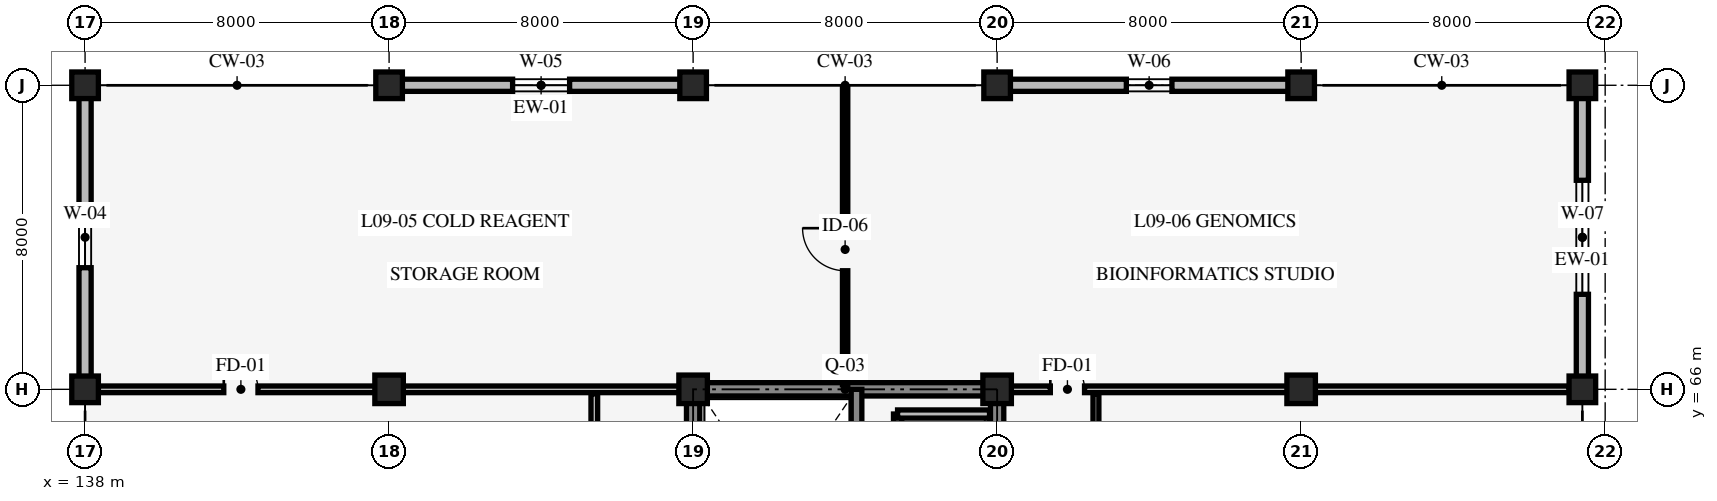
"""IFC4 building model, lengths in metres.
Left out: names, types, materials, properties, quantities, classifications, styles, units other than length and angle.
Written with IfcOpenShell. Run it as: python <this file> out.ifc"""

import sys

from ifc_helpers import new_model, si_unit, direction, frame, frame_2d, origin, origin_2d, place, context, subcontext, project, spatial, rectangle, extrude, element, fill, save


model = new_model("IFC4")
c1 = context("Model", 3, precision=1e-05, world=origin(), true_north=direction((0.0, 1.0)))
c2 = subcontext(c1, "Body", "Model", "MODEL_VIEW")
j1 = project(units=[si_unit("LENGTHUNIT", "METRE"), si_unit("PLANEANGLEUNIT", "RADIAN")], contexts=[c1])
p1 = place(None, origin())
s1 = spatial("IfcSite", under=j1, at=p1, CompositionType="ELEMENT")
p2 = place(p1, origin())
s2 = spatial("IfcBuilding", under=s1, at=p2, CompositionType="ELEMENT")
p3 = place(p2, frame((0.0, 0.0, 36.0)))
s3 = spatial("IfcBuildingStorey", under=s2, at=p3, CompositionType="ELEMENT", Elevation=36.0)
p4 = place(p3, frame((162.0, 58.0, 0.0), z_axis=(0.0, 0.0, 1.0), x_axis=(0.0, 1.0, 0.0)))
e1 = element("IfcWall", 1, at=p4, inside=s3, PredefinedType="SHEAR", context=c2, shape_type="SweptSolid", body=[
    extrude(rectangle(XDim=8.0, YDim=0.35, at=frame_2d((4.0, 0.0))), origin(), (0.0, 0.0, 1.0), 3.95),
])
p5 = place(p4, frame((3.275, 0.0, 0.0)))
e2 = element("IfcOpeningElement", 2, at=p5, cuts=e1, PredefinedType="OPENING", context=c2, shape_type="SweptSolid", body=[
    extrude(rectangle(XDim=1.05, YDim=2.2, at=frame_2d((0.525, 1.1))), frame((0.0, 0.185, 0.0), z_axis=(0.0, -1.0, 0.0), x_axis=(1.0, 0.0, 0.0)), (0.0, 0.0, 1.0), 0.37),
])
p6 = place(p4, frame((5.45, 0.0, 0.0)))
e3 = element("IfcOpeningElement", 3, at=p6, cuts=e1, PredefinedType="OPENING", context=c2, shape_type="SweptSolid", body=[
    extrude(rectangle(XDim=1.4, YDim=2.3, at=frame_2d((0.7, 1.15))), frame((0.0, 0.185, 0.0), z_axis=(0.0, -1.0, 0.0), x_axis=(1.0, 0.0, 0.0)), (0.0, 0.0, 1.0), 0.37),
])
for number, where, z_axis, x_axis in (
    (4, (162.0, 66.0, 0.0), (0.0, 0.0, 1.0), (-1.0, 0.0, 0.0)),
    (5, (154.0, 66.0, 0.0), (0.0, 0.0, 1.0), (0.0, -1.0, 0.0)),
):
    element("IfcWall", number, at=place(p3, frame(where, z_axis=z_axis, x_axis=x_axis)), inside=s3, PredefinedType="SHEAR", context=c2, shape_type="SweptSolid", body=[
        extrude(rectangle(XDim=8.0, YDim=0.35, at=frame_2d((4.0, 0.0))), origin(), (0.0, 0.0, 1.0), 3.95),
    ])
p7 = place(p3, frame((158.3, 58.0, 0.0), z_axis=(0.0, 0.0, 1.0), x_axis=(0.0, 1.0, 0.0)))
e6 = element("IfcWall", 6, at=p7, inside=s3, PredefinedType="SHEAR", context=c2, shape_type="SweptSolid", body=[
    extrude(rectangle(XDim=8.0, YDim=0.28, at=frame_2d((4.0, 0.0))), origin(), (0.0, 0.0, 1.0), 3.95),
])
for number, where, z_axis, x_axis in (
    (7, (138.0, 66.0, 0.0), (0.0, 0.0, 1.0), (1.0, 0.0, 0.0)),
    (8, (138.0, 74.0, 0.0), (0.0, 0.0, 1.0), (1.0, 0.0, 0.0)),
):
    element("IfcColumn", number, at=place(p3, frame(where, z_axis=z_axis, x_axis=x_axis)), inside=s3, PredefinedType="COLUMN", context=c2, shape_type="SweptSolid", body=[
        extrude(rectangle(XDim=0.7, YDim=0.7, at=origin_2d()), origin(), (0.0, 0.0, 1.0), 4.2),
    ])
p8 = place(p3, frame((146.0, 66.0, 0.0), z_axis=(0.0, 0.0, 1.0), x_axis=(1.0, 0.0, 0.0)))
e9 = element("IfcColumn", 9, at=p8, inside=s3, PredefinedType="COLUMN", context=c2, shape_type="SweptSolid", body=[
    extrude(rectangle(XDim=0.75, YDim=0.75, at=origin_2d()), origin(), (0.0, 0.0, 1.0), 4.2),
])
p9 = place(p3, frame((146.0, 74.0, 0.0), z_axis=(0.0, 0.0, 1.0), x_axis=(1.0, 0.0, 0.0)))
e10 = element("IfcColumn", 10, at=p9, inside=s3, PredefinedType="COLUMN", context=c2, shape_type="SweptSolid", body=[
    extrude(rectangle(XDim=0.7, YDim=0.7, at=origin_2d()), origin(), (0.0, 0.0, 1.0), 4.2),
])
p10 = place(p3, frame((154.0, 66.0, 0.0), z_axis=(0.0, 0.0, 1.0), x_axis=(1.0, 0.0, 0.0)))
e11 = element("IfcColumn", 11, at=p10, inside=s3, PredefinedType="COLUMN", context=c2, shape_type="SweptSolid", body=[
    extrude(rectangle(XDim=0.75, YDim=0.75, at=origin_2d()), origin(), (0.0, 0.0, 1.0), 4.2),
])
p11 = place(p3, frame((154.0, 74.0, 0.0), z_axis=(0.0, 0.0, 1.0), x_axis=(1.0, 0.0, 0.0)))
e12 = element("IfcColumn", 12, at=p11, inside=s3, PredefinedType="COLUMN", context=c2, shape_type="SweptSolid", body=[
    extrude(rectangle(XDim=0.7, YDim=0.7, at=origin_2d()), origin(), (0.0, 0.0, 1.0), 4.2),
])
p12 = place(p3, frame((162.0, 66.0, 0.0), z_axis=(0.0, 0.0, 1.0), x_axis=(1.0, 0.0, 0.0)))
e13 = element("IfcColumn", 13, at=p12, inside=s3, PredefinedType="COLUMN", context=c2, shape_type="SweptSolid", body=[
    extrude(rectangle(XDim=0.75, YDim=0.75, at=origin_2d()), origin(), (0.0, 0.0, 1.0), 4.2),
])
p13 = place(p3, frame((162.0, 74.0, 0.0), z_axis=(0.0, 0.0, 1.0), x_axis=(1.0, 0.0, 0.0)))
e14 = element("IfcColumn", 14, at=p13, inside=s3, PredefinedType="COLUMN", context=c2, shape_type="SweptSolid", body=[
    extrude(rectangle(XDim=0.7, YDim=0.7, at=origin_2d()), origin(), (0.0, 0.0, 1.0), 4.2),
])
p14 = place(p3, frame((170.0, 66.0, 0.0), z_axis=(0.0, 0.0, 1.0), x_axis=(1.0, 0.0, 0.0)))
e15 = element("IfcColumn", 15, at=p14, inside=s3, PredefinedType="COLUMN", context=c2, shape_type="SweptSolid", body=[
    extrude(rectangle(XDim=0.75, YDim=0.75, at=origin_2d()), origin(), (0.0, 0.0, 1.0), 4.2),
])
for number, where, z_axis, x_axis in (
    (16, (170.0, 74.0, 0.0), (0.0, 0.0, 1.0), (1.0, 0.0, 0.0)),
    (17, (177.4, 66.0, 0.0), (0.0, 0.0, 1.0), (1.0, 0.0, 0.0)),
    (18, (177.4, 74.0, 0.0), (0.0, 0.0, 1.0), (1.0, 0.0, 0.0)),
):
    element("IfcColumn", number, at=place(p3, frame(where, z_axis=z_axis, x_axis=x_axis)), inside=s3, PredefinedType="COLUMN", context=c2, shape_type="SweptSolid", body=[
        extrude(rectangle(XDim=0.7, YDim=0.7, at=origin_2d()), origin(), (0.0, 0.0, 1.0), 4.2),
    ])
p15 = place(p3, frame((138.0, 66.0, 0.0), z_axis=(0.0, 0.0, 1.0), x_axis=(0.0, 1.0, 0.0)))
e19 = element("IfcWall", 19, at=p15, inside=s3, PredefinedType="STANDARD", context=c2, shape_type="SweptSolid", body=[
    extrude(rectangle(XDim=8.0, YDim=0.32, at=frame_2d((4.0, 0.0))), origin(), (0.0, 0.0, 1.0), 3.4),
])
p16 = place(p15, frame((3.2, 0.0, 0.85)))
e20 = element("IfcOpeningElement", 20, at=p16, cuts=e19, PredefinedType="OPENING", context=c2, shape_type="SweptSolid", body=[
    extrude(rectangle(XDim=1.6, YDim=1.2, at=frame_2d((0.8, 0.6))), frame((0.0, 0.17, 0.0), z_axis=(0.0, -1.0, 0.0), x_axis=(1.0, 0.0, 0.0)), (0.0, 0.0, 1.0), 0.34),
])
p17 = place(p3, frame((146.0, 74.0, 0.0), z_axis=(0.0, 0.0, 1.0), x_axis=(1.0, 0.0, 0.0)))
e21 = element("IfcWall", 21, at=p17, inside=s3, PredefinedType="STANDARD", context=c2, shape_type="SweptSolid", body=[
    extrude(rectangle(XDim=8.0, YDim=0.32, at=frame_2d((4.0, 0.0))), origin(), (0.0, 0.0, 1.0), 3.19),
])
p18 = place(p17, frame((3.25, 0.0, 0.85)))
e22 = element("IfcOpeningElement", 22, at=p18, cuts=e21, PredefinedType="OPENING", context=c2, shape_type="SweptSolid", body=[
    extrude(rectangle(XDim=1.5, YDim=1.5, at=frame_2d((0.75, 0.75))), frame((0.0, 0.17, 0.0), z_axis=(0.0, -1.0, 0.0), x_axis=(1.0, 0.0, 0.0)), (0.0, 0.0, 1.0), 0.34),
])
p19 = place(p3, frame((162.0, 74.0, 0.0), z_axis=(0.0, 0.0, 1.0), x_axis=(1.0, 0.0, 0.0)))
e23 = element("IfcWall", 23, at=p19, inside=s3, PredefinedType="STANDARD", context=c2, shape_type="SweptSolid", body=[
    extrude(rectangle(XDim=8.0, YDim=0.32, at=frame_2d((4.0, 0.0))), origin(), (0.0, 0.0, 1.0), 3.09),
])
p20 = place(p19, frame((3.4, 0.0, 0.85)))
e24 = element("IfcOpeningElement", 24, at=p20, cuts=e23, PredefinedType="OPENING", context=c2, shape_type="SweptSolid", body=[
    extrude(rectangle(XDim=1.2, YDim=1.2, at=frame_2d((0.6, 0.6))), frame((0.0, 0.17, 0.0), z_axis=(0.0, -1.0, 0.0), x_axis=(1.0, 0.0, 0.0)), (0.0, 0.0, 1.0), 0.34),
])
p21 = place(p3, frame((177.4, 74.0, 0.0), z_axis=(0.0, 0.0, 1.0), x_axis=(0.0, -1.0, 0.0)))
e25 = element("IfcWall", 25, at=p21, inside=s3, PredefinedType="STANDARD", context=c2, shape_type="SweptSolid", body=[
    extrude(rectangle(XDim=8.0, YDim=0.32, at=frame_2d((4.0, 0.0))), origin(), (0.0, 0.0, 1.0), 3.14),
])
p22 = place(p21, frame((2.5, 0.0, 0.85)))
e26 = element("IfcOpeningElement", 26, at=p22, cuts=e25, PredefinedType="OPENING", context=c2, shape_type="SweptSolid", body=[
    extrude(rectangle(XDim=3.0, YDim=1.8, at=frame_2d((1.5, 0.9))), frame((0.0, 0.17, 0.0), z_axis=(0.0, -1.0, 0.0), x_axis=(1.0, 0.0, 0.0)), (0.0, 0.0, 1.0), 0.34),
])
p23 = place(p3, frame((159.38, 62.9, 0.0), z_axis=(0.0, 0.0, 1.0), x_axis=(0.0, 1.0, 0.0)))
e27 = element("IfcWall", 27, at=p23, inside=s3, PredefinedType="STANDARD", context=c2, shape_type="SweptSolid", body=[
    extrude(rectangle(XDim=2.45, YDim=0.215, at=frame_2d((1.225, 0.0))), origin(), (0.0, 0.0, 1.0), 3.9),
])
p24 = place(p3, frame((159.38, 65.35, 0.0), z_axis=(0.0, 0.0, 1.0), x_axis=(1.0, 0.0, 0.0)))
e28 = element("IfcWall", 28, at=p24, inside=s3, PredefinedType="STANDARD", context=c2, shape_type="SweptSolid", body=[
    extrude(rectangle(XDim=2.42, YDim=0.215, at=frame_2d((1.21, 0.0))), origin(), (0.0, 0.0, 1.0), 3.9),
])
p25 = place(p3, frame((151.4, 58.12, 0.0), z_axis=(0.0, 0.0, 1.0), x_axis=(0.0, 1.0, 0.0)))
e29 = element("IfcWall", 29, at=p25, inside=s3, PredefinedType="STANDARD", context=c2, shape_type="SweptSolid", body=[
    extrude(rectangle(XDim=7.76, YDim=0.175, at=frame_2d((3.88, 0.0))), origin(), (0.0, 0.0, 1.0), 3.9),
])
p26 = place(p25, frame((3.155, 0.0, 0.0)))
e30 = element("IfcOpeningElement", 30, at=p26, cuts=e29, PredefinedType="OPENING", context=c2, shape_type="SweptSolid", body=[
    extrude(rectangle(XDim=1.45, YDim=2.2, at=frame_2d((0.725, 1.1))), frame((0.0, 0.098, 0.0), z_axis=(0.0, -1.0, 0.0), x_axis=(1.0, 0.0, 0.0)), (0.0, 0.0, 1.0), 0.195),
])
p27 = place(p3, frame((164.6, 58.08, 0.0), z_axis=(0.0, 0.0, 1.0), x_axis=(0.0, 1.0, 0.0)))
e31 = element("IfcWall", 31, at=p27, inside=s3, PredefinedType="STANDARD", context=c2, shape_type="SweptSolid", body=[
    extrude(rectangle(XDim=7.8, YDim=0.155, at=frame_2d((3.9, 0.0))), origin(), (0.0, 0.0, 1.0), 3.9),
])
p28 = place(p27, frame((3.425, 0.0, 0.0)))
e32 = element("IfcOpeningElement", 32, at=p28, cuts=e31, PredefinedType="OPENING", context=c2, shape_type="SweptSolid", body=[
    extrude(rectangle(XDim=0.95, YDim=2.1, at=frame_2d((0.475, 1.05))), frame((0.0, 0.087, 0.0), z_axis=(0.0, -1.0, 0.0), x_axis=(1.0, 0.0, 0.0)), (0.0, 0.0, 1.0), 0.175),
])
p29 = place(p3, frame((138.35, 66.0, 0.0), z_axis=(0.0, 0.0, 1.0), x_axis=(1.0, 0.0, 0.0)))
e33 = element("IfcWall", 33, at=p29, inside=s3, PredefinedType="STANDARD", context=c2, shape_type="SweptSolid", body=[
    extrude(rectangle(XDim=15.3, YDim=0.175, at=frame_2d((7.65, 0.0))), origin(), (0.0, 0.0, 1.0), 3.09),
])
p30 = place(p29, frame((3.3, 0.0, 0.0)))
e34 = element("IfcOpeningElement", 34, at=p30, cuts=e33, PredefinedType="OPENING", context=c2, shape_type="SweptSolid", body=[
    extrude(rectangle(XDim=0.9, YDim=2.1, at=frame_2d((0.45, 1.05))), frame((0.0, 0.098, 0.0), z_axis=(0.0, -1.0, 0.0), x_axis=(1.0, 0.0, 0.0)), (0.0, 0.0, 1.0), 0.195),
])
p31 = place(p3, frame((158.0, 66.12, 0.0), z_axis=(0.0, 0.0, 1.0), x_axis=(0.0, 1.0, 0.0)))
e35 = element("IfcWall", 35, at=p31, inside=s3, PredefinedType="STANDARD", context=c2, shape_type="SweptSolid", body=[
    extrude(rectangle(XDim=7.83, YDim=0.14, at=frame_2d((3.915, 0.0))), origin(), (0.0, 0.0, 1.0), 3.9),
])
p32 = place(p31, frame((3.0, 0.0, 0.0)))
e36 = element("IfcOpeningElement", 36, at=p32, cuts=e35, PredefinedType="OPENING", context=c2, shape_type="SweptSolid", body=[
    extrude(rectangle(XDim=1.12, YDim=2.12, at=frame_2d((0.56, 1.06))), frame((0.0, 0.08, 0.0), z_axis=(0.0, -1.0, 0.0), x_axis=(1.0, 0.0, 0.0)), (0.0, 0.0, 1.0), 0.16),
])
p33 = place(p3, frame((162.35, 66.0, 0.0), z_axis=(0.0, 0.0, 1.0), x_axis=(1.0, 0.0, 0.0)))
e37 = element("IfcWall", 37, at=p33, inside=s3, PredefinedType="STANDARD", context=c2, shape_type="SweptSolid", body=[
    extrude(rectangle(XDim=14.7, YDim=0.175, at=frame_2d((7.35, 0.0))), origin(), (0.0, 0.0, 1.0), 3.09),
])
p34 = place(p33, frame((1.05, 0.0, 0.0)))
e38 = element("IfcOpeningElement", 38, at=p34, cuts=e37, PredefinedType="OPENING", context=c2, shape_type="SweptSolid", body=[
    extrude(rectangle(XDim=0.9, YDim=2.1, at=frame_2d((0.45, 1.05))), frame((0.0, 0.098, 0.0), z_axis=(0.0, -1.0, 0.0), x_axis=(1.0, 0.0, 0.0)), (0.0, 0.0, 1.0), 0.195),
])
p35 = place(p16, origin())
e39 = element("IfcWindow", 39, at=p35, inside=s3, PartitioningType="SINGLE_PANEL", PredefinedType="WINDOW", context=c2, shape_type="SweptSolid", body=[
    extrude(rectangle(XDim=1.6, YDim=1.2, at=frame_2d((0.8, 0.6))), frame((0.0, 0.03, 0.0), z_axis=(0.0, -1.0, 0.0), x_axis=(1.0, 0.0, 0.0)), (0.0, 0.0, 1.0), 0.06),
])
fill(e20, e39)
p36 = place(p18, origin())
e40 = element("IfcWindow", 40, at=p36, inside=s3, PartitioningType="SINGLE_PANEL", PredefinedType="WINDOW", context=c2, shape_type="SweptSolid", body=[
    extrude(rectangle(XDim=1.5, YDim=1.5, at=frame_2d((0.75, 0.75))), frame((0.0, 0.03, 0.0), z_axis=(0.0, -1.0, 0.0), x_axis=(1.0, 0.0, 0.0)), (0.0, 0.0, 1.0), 0.06),
])
fill(e22, e40)
p37 = place(p20, origin())
e41 = element("IfcWindow", 41, at=p37, inside=s3, PartitioningType="SINGLE_PANEL", PredefinedType="WINDOW", context=c2, shape_type="SweptSolid", body=[
    extrude(rectangle(XDim=1.2, YDim=1.2, at=frame_2d((0.6, 0.6))), frame((0.0, 0.03, 0.0), z_axis=(0.0, -1.0, 0.0), x_axis=(1.0, 0.0, 0.0)), (0.0, 0.0, 1.0), 0.06),
])
fill(e24, e41)
p38 = place(p22, origin())
e42 = element("IfcWindow", 42, at=p38, inside=s3, PartitioningType="SINGLE_PANEL", PredefinedType="WINDOW", context=c2, shape_type="SweptSolid", body=[
    extrude(rectangle(XDim=3.0, YDim=1.8, at=frame_2d((1.5, 0.9))), frame((0.0, 0.03, 0.0), z_axis=(0.0, -1.0, 0.0), x_axis=(1.0, 0.0, 0.0)), (0.0, 0.0, 1.0), 0.06),
])
fill(e26, e42)
p39 = place(p30, origin())
e43 = element("IfcDoor", 43, at=p39, inside=s3, OperationType="SINGLE_SWING_LEFT", PredefinedType="DOOR", context=c2, shape_type="SweptSolid", body=[
    extrude(rectangle(XDim=0.9, YDim=2.1, at=frame_2d((0.45, 1.05))), frame((0.0, 0.025, 0.0), z_axis=(0.0, -1.0, 0.0), x_axis=(1.0, 0.0, 0.0)), (0.0, 0.0, 1.0), 0.05),
])
fill(e34, e43)
p40 = place(p32, origin())
e44 = element("IfcDoor", 44, at=p40, inside=s3, OperationType="SINGLE_SWING_RIGHT", PredefinedType="DOOR", context=c2, shape_type="SweptSolid", body=[
    extrude(rectangle(XDim=1.12, YDim=2.12, at=frame_2d((0.56, 1.06))), frame((0.0, 0.025, 0.0), z_axis=(0.0, -1.0, 0.0), x_axis=(1.0, 0.0, 0.0)), (0.0, 0.0, 1.0), 0.05),
])
fill(e36, e44)
p41 = place(p34, origin())
e45 = element("IfcDoor", 45, at=p41, inside=s3, OperationType="SINGLE_SWING_LEFT", PredefinedType="DOOR", context=c2, shape_type="SweptSolid", body=[
    extrude(rectangle(XDim=0.9, YDim=2.1, at=frame_2d((0.45, 1.05))), frame((0.0, 0.025, 0.0), z_axis=(0.0, -1.0, 0.0), x_axis=(1.0, 0.0, 0.0)), (0.0, 0.0, 1.0), 0.05),
])
fill(e38, e45)
save(model, sys.argv[1])
